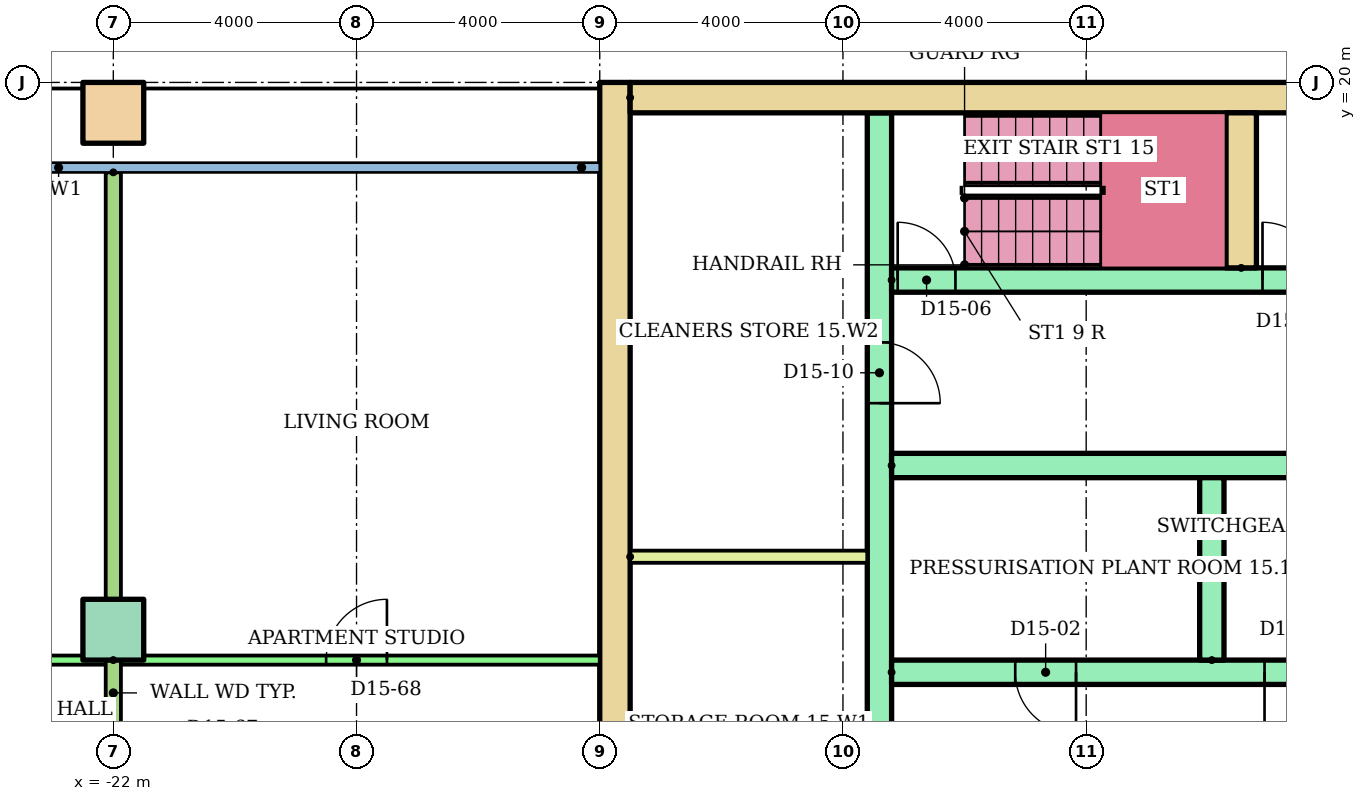
"""IFC4 building model, lengths in metres.
Left out: names, types, materials, properties, quantities, classifications, styles, units other than length and angle.
Written with IfcOpenShell. Run it as: python <this file> out.ifc"""

import sys

from ifc_helpers import new_model, si_unit, direction, frame, frame_2d, origin, origin_2d, place, context, subcontext, project, spatial, rectangle, hollow_rectangle, extrude, element, fill, save


model = new_model("IFC4")
c1 = context("Model", 3, precision=1e-05, world=origin(), true_north=direction((0.0, 1.0)))
c2 = subcontext(c1, "Body", "Model", "MODEL_VIEW")
j1 = project(units=[si_unit("LENGTHUNIT", "METRE"), si_unit("PLANEANGLEUNIT", "RADIAN")], contexts=[c1])
p1 = place(None, origin())
s1 = spatial("IfcSite", under=j1, at=p1, CompositionType="ELEMENT")
p2 = place(p1, origin())
s2 = spatial("IfcBuilding", under=s1, at=p2, CompositionType="ELEMENT")
p3 = place(p2, frame((0.0, 0.0, 57.6)))
s3 = spatial("IfcBuildingStorey", under=s2, at=p3, CompositionType="ELEMENT", Elevation=57.6)
p4 = place(p3, frame((-22.0, 11.0, 0.0)))
e1 = element("IfcColumn", 1, at=p4, inside=s3, PredefinedType="COLUMN", context=c2, shape_type="SweptSolid", body=[
    extrude(rectangle(XDim=1.0, YDim=1.0, at=origin_2d()), origin(), (0.0, 0.0, 1.0), 3.2),
])
p5 = place(p3, frame((-22.0, 19.5, 0.0)))
e2 = element("IfcColumn", 2, at=p5, inside=s3, PredefinedType="COLUMN", context=c2, shape_type="SweptSolid", body=[
    extrude(hollow_rectangle(XDim=1.0, YDim=1.0, WallThickness=0.05, at=origin_2d()), origin(), (0.0, 0.0, 1.0), 3.2),
])
p6 = place(p3, frame((-13.75, 3.0, 0.0), z_axis=(0.0, 0.0, 1.0), x_axis=(0.0, 1.0, 0.0)))
e3 = element("IfcWall", 3, at=p6, inside=s3, PredefinedType="SHEAR", context=c2, shape_type="SweptSolid", body=[
    extrude(rectangle(XDim=17.0, YDim=0.5, at=frame_2d((8.5, 0.0))), origin(), (0.0, 0.0, 1.0), 2.92),
])
p7 = place(p3, frame((-13.5, 19.75, 0.0)))
e4 = element("IfcWall", 4, at=p7, inside=s3, PredefinedType="SHEAR", context=c2, shape_type="SweptSolid", body=[
    extrude(rectangle(XDim=27.0, YDim=0.5, at=frame_2d((13.5, 0.0))), origin(), (0.0, 0.0, 1.0), 2.92),
])
p8 = place(p3, frame((-9.4, 6.8, 0.0), z_axis=(0.0, 0.0, 1.0), x_axis=(0.0, 1.0, 0.0)))
e5 = element("IfcWall", 5, at=p8, inside=s3, PredefinedType="SHEAR", context=c2, shape_type="SweptSolid", body=[
    extrude(rectangle(XDim=12.7, YDim=0.4, at=frame_2d((6.35, 0.0))), origin(), (0.0, 0.0, 1.0), 2.92),
])
p9 = place(p8, frame((1.15, 0.0, 0.0)))
e6 = element("IfcOpeningElement", 6, at=p9, cuts=e5, PredefinedType="OPENING", context=c2, shape_type="SweptSolid", body=[
    extrude(rectangle(XDim=1.0, YDim=2.1, at=frame_2d((0.5, 1.05))), frame((0.0, 0.21, 0.0), z_axis=(0.0, -1.0, 0.0), x_axis=(1.0, 0.0, 0.0)), (0.0, 0.0, 1.0), 0.42),
])
p10 = place(p8, frame((7.925, 0.0, 0.0)))
e7 = element("IfcOpeningElement", 7, at=p10, cuts=e5, PredefinedType="OPENING", context=c2, shape_type="SweptSolid", body=[
    extrude(rectangle(XDim=1.0, YDim=2.1, at=frame_2d((0.5, 1.05))), frame((0.0, 0.21, 0.0), z_axis=(0.0, -1.0, 0.0), x_axis=(1.0, 0.0, 0.0)), (0.0, 0.0, 1.0), 0.42),
])
p11 = place(p3, frame((-9.2, 10.3, 0.0)))
e8 = element("IfcWall", 8, at=p11, inside=s3, PredefinedType="SHEAR", context=c2, shape_type="SweptSolid", body=[
    extrude(rectangle(XDim=8.0, YDim=0.4, at=frame_2d((4.0, 0.0))), origin(), (0.0, 0.0, 1.0), 2.92),
])
p12 = place(p11, frame((2.033, 0.0, 0.0)))
e9 = element("IfcOpeningElement", 9, at=p12, cuts=e8, PredefinedType="OPENING", context=c2, shape_type="SweptSolid", body=[
    extrude(rectangle(XDim=1.0, YDim=2.1, at=frame_2d((0.5, 1.05))), frame((0.0, 0.21, 0.0), z_axis=(0.0, -1.0, 0.0), x_axis=(1.0, 0.0, 0.0)), (0.0, 0.0, 1.0), 0.42),
])
p13 = place(p11, frame((6.133, 0.0, 0.0)))
e10 = element("IfcOpeningElement", 10, at=p13, cuts=e8, PredefinedType="OPENING", context=c2, shape_type="SweptSolid", body=[
    extrude(rectangle(XDim=1.0, YDim=2.1, at=frame_2d((0.5, 1.05))), frame((0.0, 0.21, 0.0), z_axis=(0.0, -1.0, 0.0), x_axis=(1.0, 0.0, 0.0)), (0.0, 0.0, 1.0), 0.42),
])
p14 = place(p3, frame((-9.2, 13.7, 0.0)))
e11 = element("IfcWall", 11, at=p14, inside=s3, PredefinedType="SHEAR", context=c2, shape_type="SweptSolid", body=[
    extrude(rectangle(XDim=8.0, YDim=0.4, at=frame_2d((4.0, 0.0))), origin(), (0.0, 0.0, 1.0), 2.92),
])
p15 = place(p3, frame((-3.933, 10.5, 0.0), z_axis=(0.0, 0.0, 1.0), x_axis=(0.0, 1.0, 0.0)))
e12 = element("IfcWall", 12, at=p15, inside=s3, PredefinedType="SHEAR", context=c2, shape_type="SweptSolid", body=[
    extrude(rectangle(XDim=3.0, YDim=0.4, at=frame_2d((1.5, 0.0))), origin(), (0.0, 0.0, 1.0), 2.92),
])
p16 = place(p3, frame((-9.2, 16.75, 0.0)))
e13 = element("IfcWall", 13, at=p16, inside=s3, PredefinedType="SHEAR", context=c2, shape_type="SweptSolid", body=[
    extrude(rectangle(XDim=18.4, YDim=0.4, at=frame_2d((9.2, 0.0))), origin(), (0.0, 0.0, 1.0), 2.92),
])
p17 = place(p16, frame((0.1, 0.0, 0.0)))
e14 = element("IfcOpeningElement", 14, at=p17, cuts=e13, PredefinedType="OPENING", context=c2, shape_type="SweptSolid", body=[
    extrude(rectangle(XDim=0.95, YDim=2.1, at=frame_2d((0.475, 1.05))), frame((0.0, 0.21, 0.0), z_axis=(0.0, -1.0, 0.0), x_axis=(1.0, 0.0, 0.0)), (0.0, 0.0, 1.0), 0.42),
])
p18 = place(p16, frame((6.1, 0.0, 0.0)))
e15 = element("IfcOpeningElement", 15, at=p18, cuts=e13, PredefinedType="OPENING", context=c2, shape_type="SweptSolid", body=[
    extrude(rectangle(XDim=0.95, YDim=2.1, at=frame_2d((0.475, 1.05))), frame((0.0, 0.21, 0.0), z_axis=(0.0, -1.0, 0.0), x_axis=(1.0, 0.0, 0.0)), (0.0, 0.0, 1.0), 0.42),
])
p19 = place(p16, frame((12.1, 0.0, 0.0)))
e16 = element("IfcOpeningElement", 16, at=p19, cuts=e13, PredefinedType="OPENING", context=c2, shape_type="SweptSolid", body=[
    extrude(rectangle(XDim=0.95, YDim=2.1, at=frame_2d((0.475, 1.05))), frame((0.0, 0.21, 0.0), z_axis=(0.0, -1.0, 0.0), x_axis=(1.0, 0.0, 0.0)), (0.0, 0.0, 1.0), 0.42),
])
p20 = place(p3, frame((-3.45, 16.95, 0.0), z_axis=(0.0, 0.0, 1.0), x_axis=(0.0, 1.0, 0.0)))
e17 = element("IfcWall", 17, at=p20, inside=s3, PredefinedType="SHEAR", context=c2, shape_type="SweptSolid", body=[
    extrude(rectangle(XDim=2.55, YDim=0.5, at=frame_2d((1.275, 0.0))), origin(), (0.0, 0.0, 1.0), 2.92),
])
p21 = place(p3, frame((-13.5, 12.2, 0.0)))
e18 = element("IfcWall", 18, at=p21, inside=s3, PredefinedType="PARTITIONING", context=c2, shape_type="SweptSolid", body=[
    extrude(rectangle(XDim=3.9, YDim=0.2, at=frame_2d((1.95, 0.0))), origin(), (0.0, 0.0, 1.0), 2.92),
])
p22 = place(p3, frame((-36.52, 10.5, 0.0)))
e19 = element("IfcWall", 19, at=p22, inside=s3, PredefinedType="PARTITIONING", context=c2, shape_type="SweptSolid", body=[
    extrude(rectangle(XDim=14.52, YDim=0.15, at=frame_2d((7.26, 0.0))), origin(), (0.0, 0.0, 1.0), 2.4),
])
p23 = place(p22, frame((1.97, 0.0, 0.0)))
e20 = element("IfcOpeningElement", 20, at=p23, cuts=e19, PredefinedType="OPENING", context=c2, shape_type="SweptSolid", body=[
    extrude(rectangle(XDim=1.0, YDim=2.1, at=frame_2d((0.5, 1.05))), frame((0.0, 0.085, 0.0), z_axis=(0.0, -1.0, 0.0), x_axis=(1.0, 0.0, 0.0)), (0.0, 0.0, 1.0), 0.17),
])
p24 = place(p22, frame((9.12, 0.0, 0.0)))
e21 = element("IfcOpeningElement", 21, at=p24, cuts=e19, PredefinedType="OPENING", context=c2, shape_type="SweptSolid", body=[
    extrude(rectangle(XDim=1.0, YDim=2.1, at=frame_2d((0.5, 1.05))), frame((0.0, 0.085, 0.0), z_axis=(0.0, -1.0, 0.0), x_axis=(1.0, 0.0, 0.0)), (0.0, 0.0, 1.0), 0.17),
])
p25 = place(p3, frame((-22.0, 10.5, 0.0)))
e22 = element("IfcWall", 22, at=p25, inside=s3, PredefinedType="PARTITIONING", context=c2, shape_type="SweptSolid", body=[
    extrude(rectangle(XDim=8.0, YDim=0.15, at=frame_2d((4.0, 0.0))), origin(), (0.0, 0.0, 1.0), 2.4),
])
p26 = place(p25, frame((3.5, 0.0, 0.0)))
e23 = element("IfcOpeningElement", 23, at=p26, cuts=e22, PredefinedType="OPENING", context=c2, shape_type="SweptSolid", body=[
    extrude(rectangle(XDim=1.0, YDim=2.1, at=frame_2d((0.5, 1.05))), frame((0.0, 0.085, 0.0), z_axis=(0.0, -1.0, 0.0), x_axis=(1.0, 0.0, 0.0)), (0.0, 0.0, 1.0), 0.17),
])
p27 = place(p3, frame((-22.0, 18.521, 0.0), z_axis=(0.0, 0.0, 1.0), x_axis=(0.0, -1.0, 0.0)))
e24 = element("IfcWall", 24, at=p27, inside=s3, PredefinedType="PARTITIONING", context=c2, shape_type="SweptSolid", body=[
    extrude(rectangle(XDim=17.121, YDim=0.25, at=frame_2d((8.561, 0.0))), origin(), (0.0, 0.0, 1.0), 2.4),
])
p28 = place(p12, frame((1.0, 0.0, 0.0), z_axis=(0.0, 0.0, 1.0), x_axis=(-1.0, 0.0, 0.0)))
e25 = element("IfcDoor", 25, at=p28, inside=s3, OperationType="SINGLE_SWING_RIGHT", PredefinedType="DOOR", context=c2, shape_type="SweptSolid", body=[
    extrude(rectangle(XDim=1.0, YDim=2.1, at=frame_2d((0.5, 1.05))), frame((0.0, 0.025, 0.0), z_axis=(0.0, -1.0, 0.0), x_axis=(1.0, 0.0, 0.0)), (0.0, 0.0, 1.0), 0.05),
])
fill(e9, e25)
p29 = place(p13, frame((1.0, 0.0, 0.0), z_axis=(0.0, 0.0, 1.0), x_axis=(-1.0, 0.0, 0.0)))
e26 = element("IfcDoor", 26, at=p29, inside=s3, OperationType="SINGLE_SWING_LEFT", PredefinedType="DOOR", context=c2, shape_type="SweptSolid", body=[
    extrude(rectangle(XDim=1.0, YDim=2.1, at=frame_2d((0.5, 1.05))), frame((0.0, 0.025, 0.0), z_axis=(0.0, -1.0, 0.0), x_axis=(1.0, 0.0, 0.0)), (0.0, 0.0, 1.0), 0.05),
])
fill(e10, e26)
p30 = place(p17, origin())
e27 = element("IfcDoor", 27, at=p30, inside=s3, OperationType="SINGLE_SWING_LEFT", PredefinedType="DOOR", context=c2, shape_type="SweptSolid", body=[
    extrude(rectangle(XDim=0.95, YDim=2.1, at=frame_2d((0.475, 1.05))), frame((0.0, 0.025, 0.0), z_axis=(0.0, -1.0, 0.0), x_axis=(1.0, 0.0, 0.0)), (0.0, 0.0, 1.0), 0.05),
])
fill(e14, e27)
p31 = place(p18, origin())
e28 = element("IfcDoor", 28, at=p31, inside=s3, OperationType="SINGLE_SWING_LEFT", PredefinedType="DOOR", context=c2, shape_type="SweptSolid", body=[
    extrude(rectangle(XDim=0.95, YDim=2.1, at=frame_2d((0.475, 1.05))), frame((0.0, 0.025, 0.0), z_axis=(0.0, -1.0, 0.0), x_axis=(1.0, 0.0, 0.0)), (0.0, 0.0, 1.0), 0.05),
])
fill(e15, e28)
p32 = place(p10, frame((1.0, 0.0, 0.0), z_axis=(0.0, 0.0, 1.0), x_axis=(-1.0, 0.0, 0.0)))
e29 = element("IfcDoor", 29, at=p32, inside=s3, OperationType="SINGLE_SWING_LEFT", PredefinedType="DOOR", context=c2, shape_type="SweptSolid", body=[
    extrude(rectangle(XDim=1.0, YDim=2.1, at=frame_2d((0.5, 1.05))), frame((0.0, 0.025, 0.0), z_axis=(0.0, -1.0, 0.0), x_axis=(1.0, 0.0, 0.0)), (0.0, 0.0, 1.0), 0.05),
])
fill(e7, e29)
p33 = place(p26, origin())
e30 = element("IfcDoor", 30, at=p33, inside=s3, OperationType="SINGLE_SWING_RIGHT", PredefinedType="DOOR", context=c2, shape_type="SweptSolid", body=[
    extrude(rectangle(XDim=1.0, YDim=2.1, at=frame_2d((0.5, 1.05))), frame((0.0, 0.025, 0.0), z_axis=(0.0, -1.0, 0.0), x_axis=(1.0, 0.0, 0.0)), (0.0, 0.0, 1.0), 0.05),
])
fill(e23, e30)
save(model, sys.argv[1])
